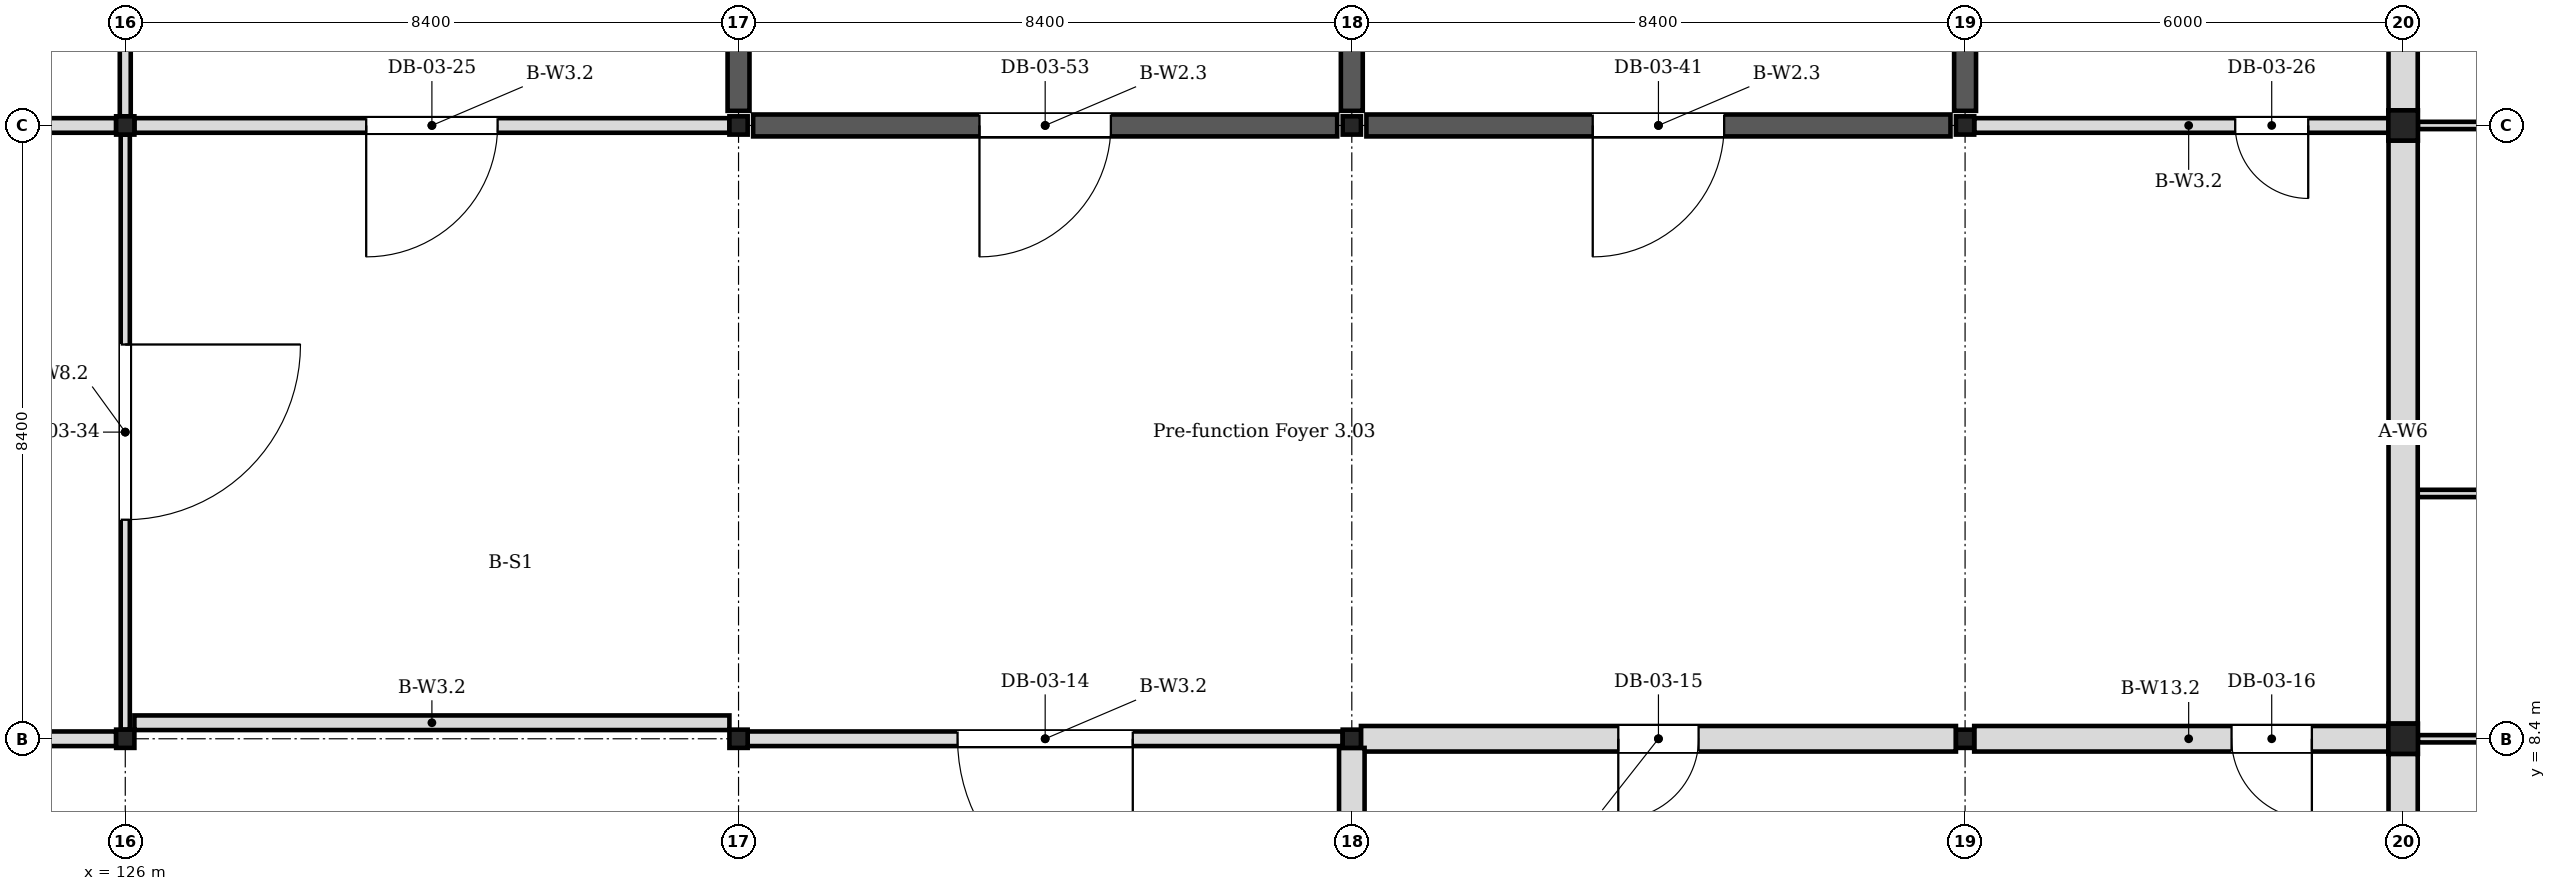
"""IFC4 building model, lengths in metres.
Left out: names, types, materials, properties, quantities, classifications, styles, units other than length and angle.
Written with IfcOpenShell. Run it as: python <this file> out.ifc"""

import sys

from ifc_helpers import new_model, si_unit, direction, frame, frame_2d, origin, origin_2d, place, context, subcontext, project, spatial, rectangle, i_section, extrude, element, fill, save


model = new_model("IFC4")
c1 = context("Model", 3, precision=1e-05, world=origin(), true_north=direction((0.0, 1.0)))
c2 = subcontext(c1, "Body", "Model", "MODEL_VIEW")
j1 = project(units=[si_unit("LENGTHUNIT", "METRE"), si_unit("PLANEANGLEUNIT", "RADIAN")], contexts=[c1])
p1 = place(None, origin())
s1 = spatial("IfcSite", under=j1, at=p1, CompositionType="ELEMENT")
p2 = place(p1, origin())
s2 = spatial("IfcBuilding", under=s1, at=p2, CompositionType="ELEMENT")
p3 = place(p2, frame((0.0, 0.0, 14.4)))
s3 = spatial("IfcBuildingStorey", under=s2, at=p3, CompositionType="ELEMENT", Elevation=14.4)
for number, where, z_axis, x_axis in (
    (1, (157.2, 8.4, 0.0), (0.0, 0.0, 1.0), (1.0, 0.0, 0.0)),
    (2, (157.2, 16.8, 0.0), (0.0, 0.0, 1.0), (1.0, 0.0, 0.0)),
):
    element("IfcColumn", number, at=place(p3, frame(where, z_axis=z_axis, x_axis=x_axis)), inside=s3, PredefinedType="COLUMN", context=c2, shape_type="SweptSolid", body=[
        extrude(i_section(OverallWidth=0.405, OverallDepth=0.414, WebThickness=0.018, FlangeThickness=0.028, FilletRadius=0.022, at=origin_2d()), origin(), (0.0, 0.0, 1.0), 4.2),
    ])
for number, where, z_axis, x_axis in (
    (3, (126.0, 8.4, 0.0), (0.0, 0.0, 1.0), (1.0, 0.0, 0.0)),
    (4, (126.0, 16.8, 0.0), (0.0, 0.0, 1.0), (1.0, 0.0, 0.0)),
    (5, (134.4, 8.4, 0.0), (0.0, 0.0, 1.0), (1.0, 0.0, 0.0)),
    (6, (134.4, 16.8, 0.0), (0.0, 0.0, 1.0), (1.0, 0.0, 0.0)),
    (7, (142.8, 8.4, 0.0), (0.0, 0.0, 1.0), (1.0, 0.0, 0.0)),
    (8, (142.8, 16.8, 0.0), (0.0, 0.0, 1.0), (1.0, 0.0, 0.0)),
    (9, (151.2, 8.4, 0.0), (0.0, 0.0, 1.0), (1.0, 0.0, 0.0)),
    (10, (151.2, 16.8, 0.0), (0.0, 0.0, 1.0), (1.0, 0.0, 0.0)),
):
    element("IfcColumn", number, at=place(p3, frame(where, z_axis=z_axis, x_axis=x_axis)), inside=s3, PredefinedType="COLUMN", context=c2, shape_type="SweptSolid", body=[
        extrude(i_section(OverallWidth=0.25, OverallDepth=0.25, WebThickness=0.009, FlangeThickness=0.014, FilletRadius=0.013, at=origin_2d()), origin(), (0.0, 0.0, 1.0), 3.95),
    ])
for number, where, z_axis, x_axis in (
    (11, (142.8, 17.0, 0.0), (0.0, 0.0, 1.0), (0.0, 1.0, 0.0)),
    (12, (151.2, 17.0, 0.0), (0.0, 0.0, 1.0), (0.0, 1.0, 0.0)),
):
    element("IfcWall", number, at=place(p3, frame(where, z_axis=z_axis, x_axis=x_axis)), inside=s3, PredefinedType="SHEAR", context=c2, shape_type="SweptSolid", body=[
        extrude(rectangle(XDim=8.0, YDim=0.3, at=frame_2d((4.0, 0.0))), origin(), (0.0, 0.0, 1.0), 3.95),
    ])
p4 = place(p3, frame((143.0, 16.8, 0.0), z_axis=(0.0, 0.0, 1.0), x_axis=(1.0, 0.0, 0.0)))
e13 = element("IfcWall", 13, at=p4, inside=s3, PredefinedType="SHEAR", context=c2, shape_type="SweptSolid", body=[
    extrude(rectangle(XDim=8.0, YDim=0.3, at=frame_2d((4.0, 0.0))), origin(), (0.0, 0.0, 1.0), 3.95),
])
p5 = place(p4, frame((3.1, 0.0, 0.0)))
e14 = element("IfcOpeningElement", 14, at=p5, cuts=e13, PredefinedType="OPENING", context=c2, shape_type="SweptSolid", body=[
    extrude(rectangle(XDim=1.8, YDim=2.1, at=frame_2d((0.9, 1.05))), frame((0.0, 0.16, 0.0), z_axis=(0.0, -1.0, 0.0), x_axis=(1.0, 0.0, 0.0)), (0.0, 0.0, 1.0), 0.32),
])
p6 = place(p3, frame((134.4, 17.0, 0.0), z_axis=(0.0, 0.0, 1.0), x_axis=(0.0, 1.0, 0.0)))
e15 = element("IfcWall", 15, at=p6, inside=s3, PredefinedType="SHEAR", context=c2, shape_type="SweptSolid", body=[
    extrude(rectangle(XDim=8.0, YDim=0.3, at=frame_2d((4.0, 0.0))), origin(), (0.0, 0.0, 1.0), 3.95),
])
p7 = place(p3, frame((134.6, 16.8, 0.0), z_axis=(0.0, 0.0, 1.0), x_axis=(1.0, 0.0, 0.0)))
e16 = element("IfcWall", 16, at=p7, inside=s3, PredefinedType="SHEAR", context=c2, shape_type="SweptSolid", body=[
    extrude(rectangle(XDim=8.0, YDim=0.3, at=frame_2d((4.0, 0.0))), origin(), (0.0, 0.0, 1.0), 3.95),
])
p8 = place(p7, frame((3.1, 0.0, 0.0)))
e17 = element("IfcOpeningElement", 17, at=p8, cuts=e16, PredefinedType="OPENING", context=c2, shape_type="SweptSolid", body=[
    extrude(rectangle(XDim=1.8, YDim=2.1, at=frame_2d((0.9, 1.05))), frame((0.0, 0.16, 0.0), z_axis=(0.0, -1.0, 0.0), x_axis=(1.0, 0.0, 0.0)), (0.0, 0.0, 1.0), 0.32),
])
for number, where, z_axis, x_axis in (
    (18, (157.403, 8.4, 0.0), (0.0, 0.0, 1.0), (1.0, 0.0, 0.0)),
    (19, (157.403, 16.8, 0.0), (0.0, 0.0, 1.0), (1.0, 0.0, 0.0)),
):
    element("IfcWall", number, at=place(p3, frame(where, z_axis=z_axis, x_axis=x_axis)), inside=s3, PredefinedType="PARTITIONING", context=c2, shape_type="SweptSolid", body=[
        extrude(rectangle(XDim=7.995, YDim=0.1, at=frame_2d((3.998, 0.0))), origin(), (0.0, 0.0, 1.0), 3.604),
    ])
p9 = place(p3, frame((157.4, 11.76, 0.0), z_axis=(0.0, 0.0, 1.0), x_axis=(1.0, 0.0, 0.0)))
e20 = element("IfcWall", 20, at=p9, inside=s3, PredefinedType="PARTITIONING", context=c2, shape_type="SweptSolid", body=[
    extrude(rectangle(XDim=8.1, YDim=0.1, at=frame_2d((4.05, 0.0))), origin(), (0.0, 0.0, 1.0), 3.604),
])
for number, where, z_axis, x_axis in (
    (21, (157.2, 0.207, 0.0), (0.0, 0.0, 1.0), (0.0, 1.0, 0.0)),
    (22, (157.2, 8.607, 0.0), (0.0, 0.0, 1.0), (0.0, 1.0, 0.0)),
):
    element("IfcWall", number, at=place(p3, frame(where, z_axis=z_axis, x_axis=x_axis)), inside=s3, PredefinedType="SOLIDWALL", context=c2, shape_type="SweptSolid", body=[
        extrude(rectangle(XDim=7.986, YDim=0.4, at=frame_2d((3.993, 0.0))), origin(), (0.0, 0.0, 1.0), 3.45),
    ])
p10 = place(p3, frame((157.2, 17.007, 0.0), z_axis=(0.0, 0.0, 1.0), x_axis=(0.0, 1.0, 0.0)))
e23 = element("IfcWall", 23, at=p10, inside=s3, PredefinedType="SOLIDWALL", context=c2, shape_type="SweptSolid", body=[
    extrude(rectangle(XDim=7.986, YDim=0.4, at=frame_2d((3.993, 0.0))), origin(), (0.0, 0.0, 1.0), 3.45),
])
p11 = place(p3, frame((117.725, 8.4, 0.0), z_axis=(0.0, 0.0, 1.0), x_axis=(1.0, 0.0, 0.0)))
e24 = element("IfcWall", 24, at=p11, inside=s3, PredefinedType="PARTITIONING", context=c2, shape_type="SweptSolid", body=[
    extrude(rectangle(XDim=8.15, YDim=0.2, at=frame_2d((4.075, 0.0))), origin(), (0.0, 0.0, 1.0), 3.25),
])
p12 = place(p11, frame((2.875, 0.0, 0.0)))
e25 = element("IfcOpeningElement", 25, at=p12, cuts=e24, PredefinedType="OPENING", context=c2, shape_type="SweptSolid", body=[
    extrude(rectangle(XDim=2.4, YDim=2.2, at=frame_2d((1.2, 1.1))), frame((0.0, 0.11, 0.0), z_axis=(0.0, -1.0, 0.0), x_axis=(1.0, 0.0, 0.0)), (0.0, 0.0, 1.0), 0.22),
])
p13 = place(p3, frame((126.125, 8.619, 0.0), z_axis=(0.0, 0.0, 1.0), x_axis=(1.0, 0.0, 0.0)))
e26 = element("IfcWall", 26, at=p13, inside=s3, PredefinedType="PARTITIONING", context=c2, shape_type="SweptSolid", body=[
    extrude(rectangle(XDim=8.15, YDim=0.2, at=frame_2d((4.075, 0.0))), origin(), (0.0, 0.0, 1.0), 3.25),
])
p14 = place(p3, frame((134.525, 8.4, 0.0), z_axis=(0.0, 0.0, 1.0), x_axis=(1.0, 0.0, 0.0)))
e27 = element("IfcWall", 27, at=p14, inside=s3, PredefinedType="PARTITIONING", context=c2, shape_type="SweptSolid", body=[
    extrude(rectangle(XDim=8.15, YDim=0.2, at=frame_2d((4.075, 0.0))), origin(), (0.0, 0.0, 1.0), 3.25),
])
p15 = place(p14, frame((2.875, 0.0, 0.0)))
e28 = element("IfcOpeningElement", 28, at=p15, cuts=e27, PredefinedType="OPENING", context=c2, shape_type="SweptSolid", body=[
    extrude(rectangle(XDim=2.4, YDim=2.2, at=frame_2d((1.2, 1.1))), frame((0.0, 0.11, 0.0), z_axis=(0.0, -1.0, 0.0), x_axis=(1.0, 0.0, 0.0)), (0.0, 0.0, 1.0), 0.22),
])
p16 = place(p3, frame((142.925, 8.4, 0.0), z_axis=(0.0, 0.0, 1.0), x_axis=(1.0, 0.0, 0.0)))
e29 = element("IfcWall", 29, at=p16, inside=s3, PredefinedType="PARTITIONING", context=c2, shape_type="SweptSolid", body=[
    extrude(rectangle(XDim=8.15, YDim=0.35, at=frame_2d((4.075, 0.0))), origin(), (0.0, 0.0, 1.0), 3.25),
])
p17 = place(p16, frame((3.525, 0.0, 0.0)))
e30 = element("IfcOpeningElement", 30, at=p17, cuts=e29, PredefinedType="OPENING", context=c2, shape_type="SweptSolid", body=[
    extrude(rectangle(XDim=1.1, YDim=2.4, at=frame_2d((0.55, 1.2))), frame((0.0, 0.185, 0.0), z_axis=(0.0, -1.0, 0.0), x_axis=(1.0, 0.0, 0.0)), (0.0, 0.0, 1.0), 0.37),
])
p18 = place(p3, frame((151.325, 8.4, 0.0), z_axis=(0.0, 0.0, 1.0), x_axis=(1.0, 0.0, 0.0)))
e31 = element("IfcWall", 31, at=p18, inside=s3, PredefinedType="PARTITIONING", context=c2, shape_type="SweptSolid", body=[
    extrude(rectangle(XDim=5.875, YDim=0.35, at=frame_2d((2.938, 0.0))), origin(), (0.0, 0.0, 1.0), 3.25),
])
p19 = place(p18, frame((3.525, 0.0, 0.0)))
e32 = element("IfcOpeningElement", 32, at=p19, cuts=e31, PredefinedType="OPENING", context=c2, shape_type="SweptSolid", body=[
    extrude(rectangle(XDim=1.1, YDim=2.4, at=frame_2d((0.55, 1.2))), frame((0.0, 0.185, 0.0), z_axis=(0.0, -1.0, 0.0), x_axis=(1.0, 0.0, 0.0)), (0.0, 0.0, 1.0), 0.37),
])
p20 = place(p3, frame((117.725, 16.8, 0.0), z_axis=(0.0, 0.0, 1.0), x_axis=(1.0, 0.0, 0.0)))
e33 = element("IfcWall", 33, at=p20, inside=s3, PredefinedType="PARTITIONING", context=c2, shape_type="SweptSolid", body=[
    extrude(rectangle(XDim=8.15, YDim=0.2, at=frame_2d((4.075, 0.0))), origin(), (0.0, 0.0, 1.0), 3.25),
])
p21 = place(p20, frame((3.175, 0.0, 0.0)))
e34 = element("IfcOpeningElement", 34, at=p21, cuts=e33, PredefinedType="OPENING", context=c2, shape_type="SweptSolid", body=[
    extrude(rectangle(XDim=1.8, YDim=2.1, at=frame_2d((0.9, 1.05))), frame((0.0, 0.11, 0.0), z_axis=(0.0, -1.0, 0.0), x_axis=(1.0, 0.0, 0.0)), (0.0, 0.0, 1.0), 0.22),
])
p22 = place(p3, frame((126.125, 16.8, 0.0), z_axis=(0.0, 0.0, 1.0), x_axis=(1.0, 0.0, 0.0)))
e35 = element("IfcWall", 35, at=p22, inside=s3, PredefinedType="PARTITIONING", context=c2, shape_type="SweptSolid", body=[
    extrude(rectangle(XDim=8.15, YDim=0.2, at=frame_2d((4.075, 0.0))), origin(), (0.0, 0.0, 1.0), 3.25),
])
p23 = place(p22, frame((3.175, 0.0, 0.0)))
e36 = element("IfcOpeningElement", 36, at=p23, cuts=e35, PredefinedType="OPENING", context=c2, shape_type="SweptSolid", body=[
    extrude(rectangle(XDim=1.8, YDim=2.1, at=frame_2d((0.9, 1.05))), frame((0.0, 0.11, 0.0), z_axis=(0.0, -1.0, 0.0), x_axis=(1.0, 0.0, 0.0)), (0.0, 0.0, 1.0), 0.22),
])
p24 = place(p3, frame((151.325, 16.8, 0.0), z_axis=(0.0, 0.0, 1.0), x_axis=(1.0, 0.0, 0.0)))
e37 = element("IfcWall", 37, at=p24, inside=s3, PredefinedType="PARTITIONING", context=c2, shape_type="SweptSolid", body=[
    extrude(rectangle(XDim=5.875, YDim=0.2, at=frame_2d((2.938, 0.0))), origin(), (0.0, 0.0, 1.0), 3.25),
])
p25 = place(p24, frame((3.575, 0.0, 0.0)))
e38 = element("IfcOpeningElement", 38, at=p25, cuts=e37, PredefinedType="OPENING", context=c2, shape_type="SweptSolid", body=[
    extrude(rectangle(XDim=1.0, YDim=2.1, at=frame_2d((0.5, 1.05))), frame((0.0, 0.11, 0.0), z_axis=(0.0, -1.0, 0.0), x_axis=(1.0, 0.0, 0.0)), (0.0, 0.0, 1.0), 0.22),
])
p26 = place(p3, frame((126.0, 8.525, 0.0), z_axis=(0.0, 0.0, 1.0), x_axis=(0.0, 1.0, 0.0)))
e39 = element("IfcWall", 39, at=p26, inside=s3, PredefinedType="PARTITIONING", context=c2, shape_type="SweptSolid", body=[
    extrude(rectangle(XDim=8.15, YDim=0.125, at=frame_2d((4.075, 0.0))), origin(), (0.0, 0.0, 1.0), 3.25),
])
p27 = place(p26, frame((2.875, 0.0, 0.0)))
e40 = element("IfcOpeningElement", 40, at=p27, cuts=e39, PredefinedType="OPENING", context=c2, shape_type="SweptSolid", body=[
    extrude(rectangle(XDim=2.4, YDim=2.2, at=frame_2d((1.2, 1.1))), frame((0.0, 0.073, 0.0), z_axis=(0.0, -1.0, 0.0), x_axis=(1.0, 0.0, 0.0)), (0.0, 0.0, 1.0), 0.145),
])
p28 = place(p3, frame((126.0, 16.925, 0.0), z_axis=(0.0, 0.0, 1.0), x_axis=(0.0, 1.0, 0.0)))
e41 = element("IfcWall", 41, at=p28, inside=s3, PredefinedType="PARTITIONING", context=c2, shape_type="SweptSolid", body=[
    extrude(rectangle(XDim=8.15, YDim=0.15, at=frame_2d((4.075, 0.0))), origin(), (0.0, 0.0, 1.0), 3.25),
])
p29 = place(p3, frame((142.8, 0.125, 0.0), z_axis=(0.0, 0.0, 1.0), x_axis=(0.0, 1.0, 0.0)))
e42 = element("IfcWall", 42, at=p29, inside=s3, PredefinedType="PARTITIONING", context=c2, shape_type="SweptSolid", body=[
    extrude(rectangle(XDim=8.15, YDim=0.35, at=frame_2d((4.075, 0.0))), origin(), (0.0, 0.0, 1.0), 3.25),
])
p30 = place(p15, origin())
e43 = element("IfcDoor", 43, at=p30, inside=s3, OperationType="DOUBLE_DOOR_SINGLE_SWING", PredefinedType="DOOR", context=c2, shape_type="SweptSolid", body=[
    extrude(rectangle(XDim=2.4, YDim=2.2, at=frame_2d((1.2, 1.1))), frame((0.0, 0.025, 0.0), z_axis=(0.0, -1.0, 0.0), x_axis=(1.0, 0.0, 0.0)), (0.0, 0.0, 1.0), 0.05),
])
fill(e28, e43)
p31 = place(p17, origin())
e44 = element("IfcDoor", 44, at=p31, inside=s3, OperationType="SINGLE_SWING_LEFT", PredefinedType="DOOR", context=c2, shape_type="SweptSolid", body=[
    extrude(rectangle(XDim=1.1, YDim=2.4, at=frame_2d((0.55, 1.2))), frame((0.0, 0.025, 0.0), z_axis=(0.0, -1.0, 0.0), x_axis=(1.0, 0.0, 0.0)), (0.0, 0.0, 1.0), 0.05),
])
fill(e30, e44)
p32 = place(p19, origin())
e45 = element("IfcDoor", 45, at=p32, inside=s3, OperationType="SINGLE_SWING_LEFT", PredefinedType="DOOR", context=c2, shape_type="SweptSolid", body=[
    extrude(rectangle(XDim=1.1, YDim=2.4, at=frame_2d((0.55, 1.2))), frame((0.0, 0.025, 0.0), z_axis=(0.0, -1.0, 0.0), x_axis=(1.0, 0.0, 0.0)), (0.0, 0.0, 1.0), 0.05),
])
fill(e32, e45)
p33 = place(p23, origin())
e46 = element("IfcDoor", 46, at=p33, inside=s3, OperationType="DOUBLE_DOOR_SINGLE_SWING", PredefinedType="DOOR", context=c2, shape_type="SweptSolid", body=[
    extrude(rectangle(XDim=1.8, YDim=2.1, at=frame_2d((0.9, 1.05))), frame((0.0, 0.025, 0.0), z_axis=(0.0, -1.0, 0.0), x_axis=(1.0, 0.0, 0.0)), (0.0, 0.0, 1.0), 0.05),
])
fill(e36, e46)
p34 = place(p25, origin())
e47 = element("IfcDoor", 47, at=p34, inside=s3, OperationType="SINGLE_SWING_LEFT", PredefinedType="DOOR", context=c2, shape_type="SweptSolid", body=[
    extrude(rectangle(XDim=1.0, YDim=2.1, at=frame_2d((0.5, 1.05))), frame((0.0, 0.025, 0.0), z_axis=(0.0, -1.0, 0.0), x_axis=(1.0, 0.0, 0.0)), (0.0, 0.0, 1.0), 0.05),
])
fill(e38, e47)
p35 = place(p27, origin())
e48 = element("IfcDoor", 48, at=p35, inside=s3, OperationType="DOUBLE_DOOR_SINGLE_SWING", PredefinedType="DOOR", context=c2, shape_type="SweptSolid", body=[
    extrude(rectangle(XDim=2.4, YDim=2.2, at=frame_2d((1.2, 1.1))), frame((0.0, 0.025, 0.0), z_axis=(0.0, -1.0, 0.0), x_axis=(1.0, 0.0, 0.0)), (0.0, 0.0, 1.0), 0.05),
])
fill(e40, e48)
p36 = place(p5, origin())
e49 = element("IfcDoor", 49, at=p36, inside=s3, OperationType="DOUBLE_DOOR_SINGLE_SWING", PredefinedType="DOOR", context=c2, shape_type="SweptSolid", body=[
    extrude(rectangle(XDim=1.8, YDim=2.1, at=frame_2d((0.9, 1.05))), frame((0.0, 0.025, 0.0), z_axis=(0.0, -1.0, 0.0), x_axis=(1.0, 0.0, 0.0)), (0.0, 0.0, 1.0), 0.05),
])
fill(e14, e49)
p37 = place(p8, origin())
e50 = element("IfcDoor", 50, at=p37, inside=s3, OperationType="DOUBLE_DOOR_SINGLE_SWING", PredefinedType="DOOR", context=c2, shape_type="SweptSolid", body=[
    extrude(rectangle(XDim=1.8, YDim=2.1, at=frame_2d((0.9, 1.05))), frame((0.0, 0.025, 0.0), z_axis=(0.0, -1.0, 0.0), x_axis=(1.0, 0.0, 0.0)), (0.0, 0.0, 1.0), 0.05),
])
fill(e17, e50)
save(model, sys.argv[1])
